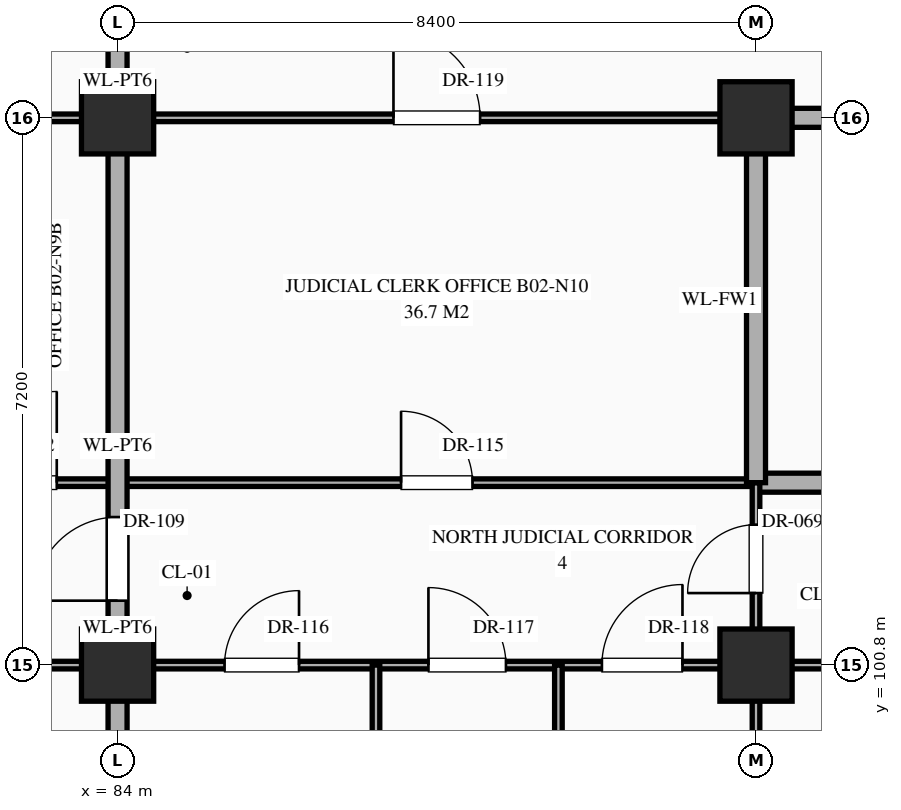
"""IFC4 building model, lengths in metres.
Left out: names, types, materials, properties, quantities, classifications, styles, units other than length and angle.
Written with IfcOpenShell. Run it as: python <this file> out.ifc"""

import sys

from ifc_helpers import new_model, si_unit, direction, frame, frame_2d, origin, origin_2d, place, context, subcontext, project, spatial, rectangle, extrude, element, fill, save


model = new_model("IFC4")
c1 = context("Model", 3, precision=1e-05, world=origin(), true_north=direction((0.0, 1.0)))
c2 = subcontext(c1, "Body", "Model", "MODEL_VIEW")
j1 = project(units=[si_unit("LENGTHUNIT", "METRE"), si_unit("PLANEANGLEUNIT", "RADIAN")], contexts=[c1])
p1 = place(None, origin())
s1 = spatial("IfcSite", under=j1, at=p1, CompositionType="ELEMENT")
p2 = place(p1, origin())
s2 = spatial("IfcBuilding", under=s1, at=p2, CompositionType="ELEMENT")
p3 = place(p2, frame((0.0, 0.0, -10.2)))
s3 = spatial("IfcBuildingStorey", under=s2, at=p3, CompositionType="ELEMENT", Elevation=-10.2)
for number, where, z_axis, x_axis in (
    (1, (84.0, 100.8, 0.0), (0.0, 0.0, 1.0), (1.0, 0.0, 0.0)),
    (2, (84.0, 108.0, 0.0), (0.0, 0.0, 1.0), (1.0, 0.0, 0.0)),
    (3, (92.4, 100.8, 0.0), (0.0, 0.0, 1.0), (1.0, 0.0, 0.0)),
    (4, (92.4, 108.0, 0.0), (0.0, 0.0, 1.0), (1.0, 0.0, 0.0)),
):
    element("IfcColumn", number, at=place(p3, frame(where, z_axis=z_axis, x_axis=x_axis)), inside=s3, PredefinedType="COLUMN", context=c2, shape_type="SweptSolid", body=[
        extrude(rectangle(XDim=0.95, YDim=0.95, at=origin_2d()), origin(), (0.0, 0.0, 1.0), 4.8),
    ])
p4 = place(p3, frame((71.4, 100.8, 0.0), z_axis=(0.0, 0.0, 1.0), x_axis=(1.0, 0.0, 0.0)))
e5 = element("IfcWall", 5, at=p4, inside=s3, PredefinedType="STANDARD", context=c2, shape_type="SweptSolid", body=[
    extrude(rectangle(XDim=25.2, YDim=0.1, at=frame_2d((12.6, 0.0))), origin(), (0.0, 0.0, 1.0), 3.63),
])
p5 = place(p4, frame((1.413, 0.0, 0.0)))
e6 = element("IfcOpeningElement", 6, at=p5, cuts=e5, PredefinedType="OPENING", context=c2, shape_type="SweptSolid", body=[
    extrude(rectangle(XDim=0.98, YDim=2.35, at=frame_2d((0.49, 1.175))), frame((0.0, 0.062, 0.0), z_axis=(0.0, -1.0, 0.0), x_axis=(1.0, 0.0, 0.0)), (0.0, 0.0, 1.0), 0.124),
])
p6 = place(p4, frame((22.867, 0.0, 0.0)))
e7 = element("IfcOpeningElement", 7, at=p6, cuts=e5, PredefinedType="OPENING", context=c2, shape_type="SweptSolid", body=[
    extrude(rectangle(XDim=0.86, YDim=2.1, at=frame_2d((0.43, 1.05))), frame((0.0, 0.062, 0.0), z_axis=(0.0, -1.0, 0.0), x_axis=(1.0, 0.0, 0.0)), (0.0, 0.0, 1.0), 0.124),
])
p7 = place(p4, frame((7.84, 0.0, 0.0)))
e8 = element("IfcOpeningElement", 8, at=p7, cuts=e5, PredefinedType="OPENING", context=c2, shape_type="SweptSolid", body=[
    extrude(rectangle(XDim=1.12, YDim=2.25, at=frame_2d((0.56, 1.125))), frame((0.0, 0.062, 0.0), z_axis=(0.0, -1.0, 0.0), x_axis=(1.0, 0.0, 0.0)), (0.0, 0.0, 1.0), 0.124),
])
p8 = place(p4, frame((14.008, 0.0, 0.0)))
e9 = element("IfcOpeningElement", 9, at=p8, cuts=e5, PredefinedType="OPENING", context=c2, shape_type="SweptSolid", body=[
    extrude(rectangle(XDim=0.98, YDim=2.35, at=frame_2d((0.49, 1.175))), frame((0.0, 0.062, 0.0), z_axis=(0.0, -1.0, 0.0), x_axis=(1.0, 0.0, 0.0)), (0.0, 0.0, 1.0), 0.124),
])
p9 = place(p4, frame((16.69, 0.0, 0.0)))
e10 = element("IfcOpeningElement", 10, at=p9, cuts=e5, PredefinedType="OPENING", context=c2, shape_type="SweptSolid", body=[
    extrude(rectangle(XDim=1.02, YDim=2.4, at=frame_2d((0.51, 1.2))), frame((0.0, 0.062, 0.0), z_axis=(0.0, -1.0, 0.0), x_axis=(1.0, 0.0, 0.0)), (0.0, 0.0, 1.0), 0.124),
])
p10 = place(p4, frame((18.972, 0.0, 0.0)))
e11 = element("IfcOpeningElement", 11, at=p10, cuts=e5, PredefinedType="OPENING", context=c2, shape_type="SweptSolid", body=[
    extrude(rectangle(XDim=1.06, YDim=2.4, at=frame_2d((0.53, 1.2))), frame((0.0, 0.062, 0.0), z_axis=(0.0, -1.0, 0.0), x_axis=(1.0, 0.0, 0.0)), (0.0, 0.0, 1.0), 0.124),
])
p11 = place(p3, frame((75.6, 103.2, 0.0), z_axis=(0.0, 0.0, 1.0), x_axis=(1.0, 0.0, 0.0)))
e12 = element("IfcWall", 12, at=p11, inside=s3, PredefinedType="STANDARD", context=c2, shape_type="SweptSolid", body=[
    extrude(rectangle(XDim=16.8, YDim=0.1, at=frame_2d((8.4, 0.0))), origin(), (0.0, 0.0, 1.0), 4.48),
])
p12 = place(p11, frame((0.88, 0.0, 0.0)))
e13 = element("IfcOpeningElement", 13, at=p12, cuts=e12, PredefinedType="OPENING", context=c2, shape_type="SweptSolid", body=[
    extrude(rectangle(XDim=1.04, YDim=2.2, at=frame_2d((0.52, 1.1))), frame((0.0, 0.062, 0.0), z_axis=(0.0, -1.0, 0.0), x_axis=(1.0, 0.0, 0.0)), (0.0, 0.0, 1.0), 0.124),
])
p13 = place(p11, frame((3.62, 0.0, 0.0)))
e14 = element("IfcOpeningElement", 14, at=p13, cuts=e12, PredefinedType="OPENING", context=c2, shape_type="SweptSolid", body=[
    extrude(rectangle(XDim=1.16, YDim=2.3, at=frame_2d((0.58, 1.15))), frame((0.0, 0.062, 0.0), z_axis=(0.0, -1.0, 0.0), x_axis=(1.0, 0.0, 0.0)), (0.0, 0.0, 1.0), 0.124),
])
p14 = place(p11, frame((6.4, 0.0, 0.0)))
e15 = element("IfcOpeningElement", 15, at=p14, cuts=e12, PredefinedType="OPENING", context=c2, shape_type="SweptSolid", body=[
    extrude(rectangle(XDim=1.2, YDim=2.35, at=frame_2d((0.6, 1.175))), frame((0.0, 0.062, 0.0), z_axis=(0.0, -1.0, 0.0), x_axis=(1.0, 0.0, 0.0)), (0.0, 0.0, 1.0), 0.124),
])
p15 = place(p11, frame((12.13, 0.0, 0.0)))
e16 = element("IfcOpeningElement", 16, at=p15, cuts=e12, PredefinedType="OPENING", context=c2, shape_type="SweptSolid", body=[
    extrude(rectangle(XDim=0.94, YDim=2.3, at=frame_2d((0.47, 1.15))), frame((0.0, 0.062, 0.0), z_axis=(0.0, -1.0, 0.0), x_axis=(1.0, 0.0, 0.0)), (0.0, 0.0, 1.0), 0.124),
])
p16 = place(p3, frame((92.4, 103.2, 0.0), z_axis=(0.0, 0.0, 1.0), x_axis=(1.0, 0.0, 0.0)))
e17 = element("IfcWall", 17, at=p16, inside=s3, PredefinedType="STANDARD", context=c2, shape_type="SweptSolid", body=[
    extrude(rectangle(XDim=4.2, YDim=0.25, at=frame_2d((2.1, 0.0))), origin(), (0.0, 0.0, 1.0), 4.48),
])
p17 = place(p16, frame((1.55, 0.0, 0.0)))
e18 = element("IfcOpeningElement", 18, at=p17, cuts=e17, PredefinedType="OPENING", context=c2, shape_type="SweptSolid", body=[
    extrude(rectangle(XDim=1.1, YDim=2.2, at=frame_2d((0.55, 1.1))), frame((0.0, 0.137, 0.0), z_axis=(0.0, -1.0, 0.0), x_axis=(1.0, 0.0, 0.0)), (0.0, 0.0, 1.0), 0.274),
])
p18 = place(p3, frame((75.6, 108.0, 0.0), z_axis=(0.0, 0.0, 1.0), x_axis=(1.0, 0.0, 0.0)))
e19 = element("IfcWall", 19, at=p18, inside=s3, PredefinedType="STANDARD", context=c2, shape_type="SweptSolid", body=[
    extrude(rectangle(XDim=16.8, YDim=0.1, at=frame_2d((8.4, 0.0))), origin(), (0.0, 0.0, 1.0), 3.63),
])
p19 = place(p18, frame((0.958, 0.0, 0.0)))
e20 = element("IfcOpeningElement", 20, at=p19, cuts=e19, PredefinedType="OPENING", context=c2, shape_type="SweptSolid", body=[
    extrude(rectangle(XDim=1.28, YDim=2.35, at=frame_2d((0.64, 1.175))), frame((0.0, 0.062, 0.0), z_axis=(0.0, -1.0, 0.0), x_axis=(1.0, 0.0, 0.0)), (0.0, 0.0, 1.0), 0.124),
])
p20 = place(p18, frame((12.03, 0.0, 0.0)))
e21 = element("IfcOpeningElement", 21, at=p20, cuts=e19, PredefinedType="OPENING", context=c2, shape_type="SweptSolid", body=[
    extrude(rectangle(XDim=1.14, YDim=2.4, at=frame_2d((0.57, 1.2))), frame((0.0, 0.062, 0.0), z_axis=(0.0, -1.0, 0.0), x_axis=(1.0, 0.0, 0.0)), (0.0, 0.0, 1.0), 0.124),
])
p21 = place(p18, frame((3.62, 0.0, 0.0)))
e22 = element("IfcOpeningElement", 22, at=p21, cuts=e19, PredefinedType="OPENING", context=c2, shape_type="SweptSolid", body=[
    extrude(rectangle(XDim=1.16, YDim=2.3, at=frame_2d((0.58, 1.15))), frame((0.0, 0.062, 0.0), z_axis=(0.0, -1.0, 0.0), x_axis=(1.0, 0.0, 0.0)), (0.0, 0.0, 1.0), 0.124),
])
p22 = place(p18, frame((6.202, 0.0, 0.0)))
e23 = element("IfcOpeningElement", 23, at=p22, cuts=e19, PredefinedType="OPENING", context=c2, shape_type="SweptSolid", body=[
    extrude(rectangle(XDim=1.2, YDim=2.35, at=frame_2d((0.6, 1.175))), frame((0.0, 0.062, 0.0), z_axis=(0.0, -1.0, 0.0), x_axis=(1.0, 0.0, 0.0)), (0.0, 0.0, 1.0), 0.124),
])
p23 = place(p3, frame((92.4, 108.0, 0.0), z_axis=(0.0, 0.0, 1.0), x_axis=(1.0, 0.0, 0.0)))
e24 = element("IfcWall", 24, at=p23, inside=s3, PredefinedType="STANDARD", context=c2, shape_type="SweptSolid", body=[
    extrude(rectangle(XDim=4.2, YDim=0.25, at=frame_2d((2.1, 0.0))), origin(), (0.0, 0.0, 1.0), 3.63),
])
p24 = place(p23, frame((1.798, 0.0, 0.0)))
e25 = element("IfcOpeningElement", 25, at=p24, cuts=e24, PredefinedType="OPENING", context=c2, shape_type="SweptSolid", body=[
    extrude(rectangle(XDim=1.0, YDim=2.2, at=frame_2d((0.5, 1.1))), frame((0.0, 0.137, 0.0), z_axis=(0.0, -1.0, 0.0), x_axis=(1.0, 0.0, 0.0)), (0.0, 0.0, 1.0), 0.274),
])
p25 = place(p3, frame((84.0, 79.2, 0.0), z_axis=(0.0, 0.0, 1.0), x_axis=(0.0, 1.0, 0.0)))
e26 = element("IfcWall", 26, at=p25, inside=s3, PredefinedType="STANDARD", context=c2, shape_type="SweptSolid", body=[
    extrude(rectangle(XDim=35.96, YDim=0.25, at=frame_2d((17.98, 0.0))), origin(), (0.0, 0.0, 1.0), 3.73),
])
p26 = place(p25, frame((22.448, 0.0, 0.0)))
e27 = element("IfcOpeningElement", 27, at=p26, cuts=e26, PredefinedType="OPENING", context=c2, shape_type="SweptSolid", body=[
    extrude(rectangle(XDim=1.1, YDim=2.2, at=frame_2d((0.55, 1.1))), frame((0.0, 0.137, 0.0), z_axis=(0.0, -1.0, 0.0), x_axis=(1.0, 0.0, 0.0)), (0.0, 0.0, 1.0), 0.274),
])
p27 = place(p25, frame((12.502, 0.0, 0.0)))
e28 = element("IfcOpeningElement", 28, at=p27, cuts=e26, PredefinedType="OPENING", context=c2, shape_type="SweptSolid", body=[
    extrude(rectangle(XDim=1.0, YDim=2.2, at=frame_2d((0.5, 1.1))), frame((0.0, 0.137, 0.0), z_axis=(0.0, -1.0, 0.0), x_axis=(1.0, 0.0, 0.0)), (0.0, 0.0, 1.0), 0.274),
])
p28 = place(p25, frame((15.248, 0.0, 0.0)))
e29 = element("IfcOpeningElement", 29, at=p28, cuts=e26, PredefinedType="OPENING", context=c2, shape_type="SweptSolid", body=[
    extrude(rectangle(XDim=1.1, YDim=2.2, at=frame_2d((0.55, 1.1))), frame((0.0, 0.137, 0.0), z_axis=(0.0, -1.0, 0.0), x_axis=(1.0, 0.0, 0.0)), (0.0, 0.0, 1.0), 0.274),
])
p29 = place(p25, frame((29.722, 0.0, 0.0)))
e30 = element("IfcOpeningElement", 30, at=p29, cuts=e26, PredefinedType="OPENING", context=c2, shape_type="SweptSolid", body=[
    extrude(rectangle(XDim=0.95, YDim=2.15, at=frame_2d((0.475, 1.075))), frame((0.0, 0.137, 0.0), z_axis=(0.0, -1.0, 0.0), x_axis=(1.0, 0.0, 0.0)), (0.0, 0.0, 1.0), 0.274),
])
p30 = place(p25, frame((5.302, 0.0, 0.0)))
e31 = element("IfcOpeningElement", 31, at=p30, cuts=e26, PredefinedType="OPENING", context=c2, shape_type="SweptSolid", body=[
    extrude(rectangle(XDim=1.0, YDim=2.2, at=frame_2d((0.5, 1.1))), frame((0.0, 0.137, 0.0), z_axis=(0.0, -1.0, 0.0), x_axis=(1.0, 0.0, 0.0)), (0.0, 0.0, 1.0), 0.274),
])
p31 = place(p3, frame((87.4, 96.0, 0.0), z_axis=(0.0, 0.0, 1.0), x_axis=(0.0, 1.0, 0.0)))
e32 = element("IfcWall", 32, at=p31, inside=s3, PredefinedType="STANDARD", context=c2, shape_type="SweptSolid", body=[
    extrude(rectangle(XDim=4.8, YDim=0.1, at=frame_2d((2.4, 0.0))), origin(), (0.0, 0.0, 1.0), 4.48),
])
p32 = place(p31, frame((1.78, 0.0, 0.0)))
e33 = element("IfcOpeningElement", 33, at=p32, cuts=e32, PredefinedType="OPENING", context=c2, shape_type="SweptSolid", body=[
    extrude(rectangle(XDim=1.24, YDim=2.3, at=frame_2d((0.62, 1.15))), frame((0.0, 0.062, 0.0), z_axis=(0.0, -1.0, 0.0), x_axis=(1.0, 0.0, 0.0)), (0.0, 0.0, 1.0), 0.124),
])
p33 = place(p3, frame((89.8, 96.0, 0.0), z_axis=(0.0, 0.0, 1.0), x_axis=(0.0, 1.0, 0.0)))
e34 = element("IfcWall", 34, at=p33, inside=s3, PredefinedType="STANDARD", context=c2, shape_type="SweptSolid", body=[
    extrude(rectangle(XDim=4.8, YDim=0.1, at=frame_2d((2.4, 0.0))), origin(), (0.0, 0.0, 1.0), 4.48),
])
p34 = place(p33, frame((1.76, 0.0, 0.0)))
e35 = element("IfcOpeningElement", 35, at=p34, cuts=e34, PredefinedType="OPENING", context=c2, shape_type="SweptSolid", body=[
    extrude(rectangle(XDim=1.28, YDim=2.35, at=frame_2d((0.64, 1.175))), frame((0.0, 0.062, 0.0), z_axis=(0.0, -1.0, 0.0), x_axis=(1.0, 0.0, 0.0)), (0.0, 0.0, 1.0), 0.124),
])
p35 = place(p3, frame((92.4, 96.0, 0.0), z_axis=(0.0, 0.0, 1.0), x_axis=(0.0, 1.0, 0.0)))
e36 = element("IfcWall", 36, at=p35, inside=s3, PredefinedType="STANDARD", context=c2, shape_type="SweptSolid", body=[
    extrude(rectangle(XDim=7.2, YDim=0.1, at=frame_2d((3.6, 0.0))), origin(), (0.0, 0.0, 1.0), 3.73),
])
p36 = place(p35, frame((5.748, 0.0, 0.0)))
e37 = element("IfcOpeningElement", 37, at=p36, cuts=e36, PredefinedType="OPENING", context=c2, shape_type="SweptSolid", body=[
    extrude(rectangle(XDim=0.9, YDim=2.15, at=frame_2d((0.45, 1.075))), frame((0.0, 0.062, 0.0), z_axis=(0.0, -1.0, 0.0), x_axis=(1.0, 0.0, 0.0)), (0.0, 0.0, 1.0), 0.124),
])
p37 = place(p3, frame((92.4, 103.2, 0.0), z_axis=(0.0, 0.0, 1.0), x_axis=(0.0, 1.0, 0.0)))
e38 = element("IfcWall", 38, at=p37, inside=s3, PredefinedType="STANDARD", context=c2, shape_type="SweptSolid", body=[
    extrude(rectangle(XDim=4.8, YDim=0.25, at=frame_2d((2.4, 0.0))), origin(), (0.0, 0.0, 1.0), 3.73),
])
p38 = place(p36, origin())
e39 = element("IfcDoor", 39, at=p38, inside=s3, OperationType="SINGLE_SWING_LEFT", PredefinedType="DOOR", context=c2, shape_type="SweptSolid", body=[
    extrude(rectangle(XDim=0.9, YDim=2.15, at=frame_2d((0.45, 1.075))), frame((0.0, 0.025, 0.0), z_axis=(0.0, -1.0, 0.0), x_axis=(1.0, 0.0, 0.0)), (0.0, 0.0, 1.0), 0.05),
])
fill(e37, e39)
p39 = place(p26, origin())
e40 = element("IfcDoor", 40, at=p39, inside=s3, OperationType="SINGLE_SWING_LEFT", PredefinedType="DOOR", context=c2, shape_type="SweptSolid", body=[
    extrude(rectangle(XDim=1.1, YDim=2.2, at=frame_2d((0.55, 1.1))), frame((0.0, 0.025, 0.0), z_axis=(0.0, -1.0, 0.0), x_axis=(1.0, 0.0, 0.0)), (0.0, 0.0, 1.0), 0.05),
])
fill(e27, e40)
p40 = place(p14, origin())
e41 = element("IfcDoor", 41, at=p40, inside=s3, OperationType="SINGLE_SWING_RIGHT", PredefinedType="DOOR", context=c2, shape_type="SweptSolid", body=[
    extrude(rectangle(XDim=1.2, YDim=2.35, at=frame_2d((0.6, 1.175))), frame((0.0, 0.025, 0.0), z_axis=(0.0, -1.0, 0.0), x_axis=(1.0, 0.0, 0.0)), (0.0, 0.0, 1.0), 0.05),
])
fill(e15, e41)
p41 = place(p15, origin())
e42 = element("IfcDoor", 42, at=p41, inside=s3, OperationType="SINGLE_SWING_LEFT", PredefinedType="DOOR", context=c2, shape_type="SweptSolid", body=[
    extrude(rectangle(XDim=0.94, YDim=2.3, at=frame_2d((0.47, 1.15))), frame((0.0, 0.025, 0.0), z_axis=(0.0, -1.0, 0.0), x_axis=(1.0, 0.0, 0.0)), (0.0, 0.0, 1.0), 0.05),
])
fill(e16, e42)
p42 = place(p8, origin())
e43 = element("IfcDoor", 43, at=p42, inside=s3, OperationType="SINGLE_SWING_RIGHT", PredefinedType="DOOR", context=c2, shape_type="SweptSolid", body=[
    extrude(rectangle(XDim=0.98, YDim=2.35, at=frame_2d((0.49, 1.175))), frame((0.0, 0.025, 0.0), z_axis=(0.0, -1.0, 0.0), x_axis=(1.0, 0.0, 0.0)), (0.0, 0.0, 1.0), 0.05),
])
fill(e9, e43)
p43 = place(p9, origin())
e44 = element("IfcDoor", 44, at=p43, inside=s3, OperationType="SINGLE_SWING_LEFT", PredefinedType="DOOR", context=c2, shape_type="SweptSolid", body=[
    extrude(rectangle(XDim=1.02, YDim=2.4, at=frame_2d((0.51, 1.2))), frame((0.0, 0.025, 0.0), z_axis=(0.0, -1.0, 0.0), x_axis=(1.0, 0.0, 0.0)), (0.0, 0.0, 1.0), 0.05),
])
fill(e10, e44)
p44 = place(p10, origin())
e45 = element("IfcDoor", 45, at=p44, inside=s3, OperationType="SINGLE_SWING_RIGHT", PredefinedType="DOOR", context=c2, shape_type="SweptSolid", body=[
    extrude(rectangle(XDim=1.06, YDim=2.4, at=frame_2d((0.53, 1.2))), frame((0.0, 0.025, 0.0), z_axis=(0.0, -1.0, 0.0), x_axis=(1.0, 0.0, 0.0)), (0.0, 0.0, 1.0), 0.05),
])
fill(e11, e45)
p45 = place(p20, origin())
e46 = element("IfcDoor", 46, at=p45, inside=s3, OperationType="SINGLE_SWING_LEFT", PredefinedType="DOOR", context=c2, shape_type="SweptSolid", body=[
    extrude(rectangle(XDim=1.14, YDim=2.4, at=frame_2d((0.57, 1.2))), frame((0.0, 0.025, 0.0), z_axis=(0.0, -1.0, 0.0), x_axis=(1.0, 0.0, 0.0)), (0.0, 0.0, 1.0), 0.05),
])
fill(e21, e46)
save(model, sys.argv[1])
